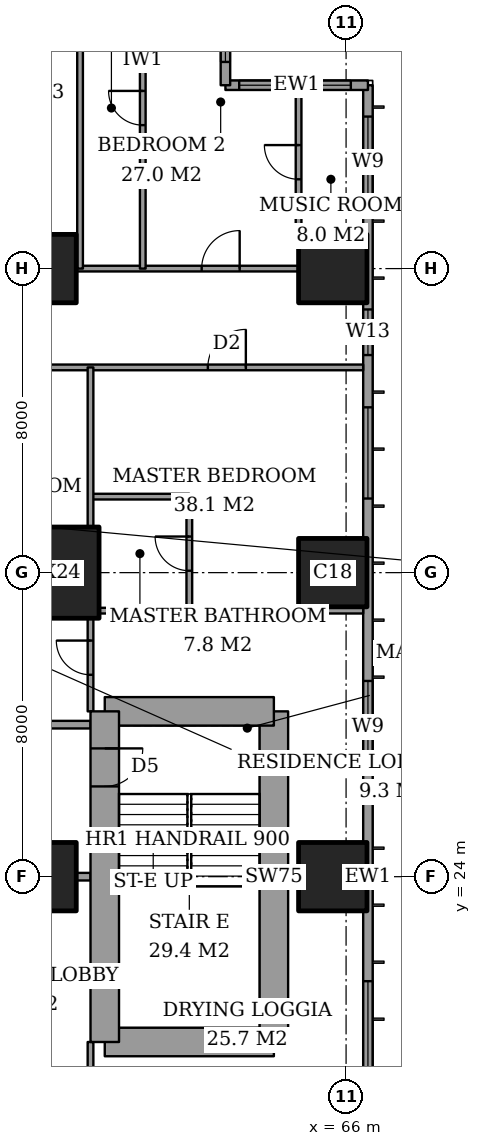
"""IFC4 building model, lengths in metres.
Left out: names, types, materials, properties, quantities, classifications, styles, units other than length and angle.
Written with IfcOpenShell. Run it as: python <this file> out.ifc"""

import sys

from ifc_helpers import new_model, si_unit, direction, frame, frame_2d, origin, origin_2d, place, context, subcontext, project, spatial, rectangle, extrude, element, fill, save


model = new_model("IFC4")
c1 = context("Model", 3, precision=1e-05, world=origin(), true_north=direction((0.0, 1.0)))
c2 = subcontext(c1, "Body", "Model", "MODEL_VIEW")
j1 = project(units=[si_unit("LENGTHUNIT", "METRE"), si_unit("PLANEANGLEUNIT", "RADIAN")], contexts=[c1])
p1 = place(None, origin())
s1 = spatial("IfcSite", under=j1, at=p1, CompositionType="ELEMENT")
p2 = place(p1, origin())
s2 = spatial("IfcBuilding", under=s1, at=p2, CompositionType="ELEMENT")
p3 = place(p2, frame((0.0, 0.0, 214.6)))
s3 = spatial("IfcBuildingStorey", under=s2, at=p3, CompositionType="ELEMENT", Elevation=214.6)
p4 = place(p3, frame((58.0, 24.0, 0.0), z_axis=(0.0, 0.0, 1.0), x_axis=(1.0, 0.0, 0.0)))
e1 = element("IfcColumn", 1, at=p4, inside=s3, PredefinedType="COLUMN", context=c2, shape_type="SweptSolid", body=[
    extrude(rectangle(XDim=1.8, YDim=1.8, at=origin_2d()), origin(), (0.0, 0.0, 1.0), 3.6),
])
p5 = place(p3, frame((58.0, 32.0, 0.0), z_axis=(0.0, 0.0, 1.0), x_axis=(1.0, 0.0, 0.0)))
e2 = element("IfcColumn", 2, at=p5, inside=s3, PredefinedType="COLUMN", context=c2, shape_type="SweptSolid", body=[
    extrude(rectangle(XDim=3.0, YDim=2.4, at=origin_2d()), origin(), (0.0, 0.0, 1.0), 3.6),
])
for number, where, z_axis, x_axis in (
    (3, (58.0, 40.0, 0.0), (0.0, 0.0, 1.0), (1.0, 0.0, 0.0)),
    (4, (65.65, 24.0, 0.0), (0.0, 0.0, 1.0), (1.0, 0.0, 0.0)),
    (5, (65.65, 32.0, 0.0), (0.0, 0.0, 1.0), (1.0, 0.0, 0.0)),
    (6, (65.65, 40.0, 0.0), (0.0, 0.0, 1.0), (1.0, 0.0, 0.0)),
):
    element("IfcColumn", number, at=place(p3, frame(where, z_axis=z_axis, x_axis=x_axis)), inside=s3, PredefinedType="COLUMN", context=c2, shape_type="SweptSolid", body=[
        extrude(rectangle(XDim=1.8, YDim=1.8, at=origin_2d()), origin(), (0.0, 0.0, 1.0), 3.6),
    ])
p6 = place(p3, frame((59.65, 19.65, 0.0), z_axis=(0.0, 0.0, 1.0), x_axis=(1.0, 0.0, 0.0)))
e7 = element("IfcWall", 7, at=p6, inside=s3, PredefinedType="SHEAR", context=c2, shape_type="SweptSolid", body=[
    extrude(rectangle(XDim=4.45, YDim=0.75, at=frame_2d((2.225, 0.0))), origin(), (0.0, 0.0, 1.0), 3.6),
])
p7 = place(p3, frame((64.1, 19.65, 0.0), z_axis=(0.0, 0.0, 1.0), x_axis=(0.0, 1.0, 0.0)))
e8 = element("IfcWall", 8, at=p7, inside=s3, PredefinedType="SHEAR", context=c2, shape_type="SweptSolid", body=[
    extrude(rectangle(XDim=8.7, YDim=0.75, at=frame_2d((4.35, 0.0))), origin(), (0.0, 0.0, 1.0), 3.6),
])
p8 = place(p3, frame((64.1, 28.35, 0.0), z_axis=(0.0, 0.0, 1.0), x_axis=(-1.0, 0.0, 0.0)))
e9 = element("IfcWall", 9, at=p8, inside=s3, PredefinedType="SHEAR", context=c2, shape_type="SweptSolid", body=[
    extrude(rectangle(XDim=4.45, YDim=0.75, at=frame_2d((2.225, 0.0))), origin(), (0.0, 0.0, 1.0), 3.6),
])
p9 = place(p3, frame((59.65, 28.35, 0.0), z_axis=(0.0, 0.0, 1.0), x_axis=(0.0, -1.0, 0.0)))
e10 = element("IfcWall", 10, at=p9, inside=s3, PredefinedType="SHEAR", context=c2, shape_type="SweptSolid", body=[
    extrude(rectangle(XDim=8.7, YDim=0.75, at=frame_2d((4.35, 0.0))), origin(), (0.0, 0.0, 1.0), 3.6),
])
p10 = place(p9, frame((0.975, 0.0, 0.0)))
e11 = element("IfcOpeningElement", 11, at=p10, cuts=e10, PredefinedType="OPENING", context=c2, shape_type="SweptSolid", body=[
    extrude(rectangle(XDim=1.0, YDim=2.1, at=frame_2d((0.5, 1.05))), frame((0.0, 0.385, 0.0), z_axis=(0.0, -1.0, 0.0), x_axis=(1.0, 0.0, 0.0)), (0.0, 0.0, 1.0), 0.77),
])
p11 = place(p3, frame((66.575, 3.175, 0.0), z_axis=(0.0, 0.0, 1.0), x_axis=(0.0, 1.0, 0.0)))
e12 = element("IfcWall", 12, at=p11, inside=s3, PredefinedType="SOLIDWALL", context=c2, shape_type="SweptSolid", body=[
    extrude(rectangle(XDim=41.65, YDim=0.25, at=frame_2d((20.825, 0.0))), origin(), (0.0, 0.0, 1.0), 3.6),
])
p12 = place(p11, frame((0.825, 0.0, 0.2)))
e13 = element("IfcOpeningElement", 13, at=p12, cuts=e12, PredefinedType="OPENING", context=c2, shape_type="SweptSolid", body=[
    extrude(rectangle(XDim=2.4, YDim=2.4, at=frame_2d((1.2, 1.2))), frame((0.0, 0.135, 0.0), z_axis=(0.0, -1.0, 0.0), x_axis=(1.0, 0.0, 0.0)), (0.0, 0.0, 1.0), 0.27),
])
p13 = place(p11, frame((6.225, 0.0, 0.2)))
e14 = element("IfcOpeningElement", 14, at=p13, cuts=e12, PredefinedType="OPENING", context=c2, shape_type="SweptSolid", body=[
    extrude(rectangle(XDim=1.2, YDim=2.4, at=frame_2d((0.6, 1.2))), frame((0.0, 0.135, 0.0), z_axis=(0.0, -1.0, 0.0), x_axis=(1.0, 0.0, 0.0)), (0.0, 0.0, 1.0), 0.27),
])
p14 = place(p11, frame((8.675, 0.0, 0.2)))
e15 = element("IfcOpeningElement", 15, at=p14, cuts=e12, PredefinedType="OPENING", context=c2, shape_type="SweptSolid", body=[
    extrude(rectangle(XDim=2.4, YDim=2.4, at=frame_2d((1.2, 1.2))), frame((0.0, 0.135, 0.0), z_axis=(0.0, -1.0, 0.0), x_axis=(1.0, 0.0, 0.0)), (0.0, 0.0, 1.0), 0.27),
])
p15 = place(p11, frame((15.675, 0.0, 0.2)))
e16 = element("IfcOpeningElement", 16, at=p15, cuts=e12, PredefinedType="OPENING", context=c2, shape_type="SweptSolid", body=[
    extrude(rectangle(XDim=2.4, YDim=2.4, at=frame_2d((1.2, 1.2))), frame((0.0, 0.135, 0.0), z_axis=(0.0, -1.0, 0.0), x_axis=(1.0, 0.0, 0.0)), (0.0, 0.0, 1.0), 0.27),
])
p16 = place(p11, frame((23.575, 0.0, 0.2)))
e17 = element("IfcOpeningElement", 17, at=p16, cuts=e12, PredefinedType="OPENING", context=c2, shape_type="SweptSolid", body=[
    extrude(rectangle(XDim=2.4, YDim=2.4, at=frame_2d((1.2, 1.2))), frame((0.0, 0.135, 0.0), z_axis=(0.0, -1.0, 0.0), x_axis=(1.0, 0.0, 0.0)), (0.0, 0.0, 1.0), 0.27),
])
p17 = place(p11, frame((30.775, 0.0, 0.2)))
e18 = element("IfcOpeningElement", 18, at=p17, cuts=e12, PredefinedType="OPENING", context=c2, shape_type="SweptSolid", body=[
    extrude(rectangle(XDim=2.4, YDim=2.4, at=frame_2d((1.2, 1.2))), frame((0.0, 0.135, 0.0), z_axis=(0.0, -1.0, 0.0), x_axis=(1.0, 0.0, 0.0)), (0.0, 0.0, 1.0), 0.27),
])
p18 = place(p11, frame((34.55, 0.0, 0.2)))
e19 = element("IfcOpeningElement", 19, at=p18, cuts=e12, PredefinedType="OPENING", context=c2, shape_type="SweptSolid", body=[
    extrude(rectangle(XDim=1.2, YDim=2.4, at=frame_2d((0.6, 1.2))), frame((0.0, 0.135, 0.0), z_axis=(0.0, -1.0, 0.0), x_axis=(1.0, 0.0, 0.0)), (0.0, 0.0, 1.0), 0.27),
])
p19 = place(p11, frame((38.425, 0.0, 0.2)))
e20 = element("IfcOpeningElement", 20, at=p19, cuts=e12, PredefinedType="OPENING", context=c2, shape_type="SweptSolid", body=[
    extrude(rectangle(XDim=2.4, YDim=2.4, at=frame_2d((1.2, 1.2))), frame((0.0, 0.135, 0.0), z_axis=(0.0, -1.0, 0.0), x_axis=(1.0, 0.0, 0.0)), (0.0, 0.0, 1.0), 0.27),
])
p20 = place(p3, frame((66.575, 44.825, 0.0), z_axis=(0.0, 0.0, 1.0), x_axis=(-1.0, 0.0, 0.0)))
e21 = element("IfcWall", 21, at=p20, inside=s3, PredefinedType="SOLIDWALL", context=c2, shape_type="SweptSolid", body=[
    extrude(rectangle(XDim=3.75, YDim=0.25, at=frame_2d((1.875, 0.0))), origin(), (0.0, 0.0, 1.0), 3.6),
])
p21 = place(p20, frame((0.45, 0.0, 0.2)))
e22 = element("IfcOpeningElement", 22, at=p21, cuts=e21, PredefinedType="OPENING", context=c2, shape_type="SweptSolid", body=[
    extrude(rectangle(XDim=1.2, YDim=2.4, at=frame_2d((0.6, 1.2))), frame((0.0, 0.135, 0.0), z_axis=(0.0, -1.0, 0.0), x_axis=(1.0, 0.0, 0.0)), (0.0, 0.0, 1.0), 0.27),
])
p22 = place(p20, frame((2.188, 0.0, 0.2)))
e23 = element("IfcOpeningElement", 23, at=p22, cuts=e21, PredefinedType="OPENING", context=c2, shape_type="SweptSolid", body=[
    extrude(rectangle(XDim=1.2, YDim=2.4, at=frame_2d((0.6, 1.2))), frame((0.0, 0.135, 0.0), z_axis=(0.0, -1.0, 0.0), x_axis=(1.0, 0.0, 0.0)), (0.0, 0.0, 1.0), 0.27),
])
p23 = place(p3, frame((62.825, 44.825, 0.0), z_axis=(0.0, 0.0, 1.0), x_axis=(0.0, 1.0, 0.0)))
e24 = element("IfcWall", 24, at=p23, inside=s3, PredefinedType="SOLIDWALL", context=c2, shape_type="SweptSolid", body=[
    extrude(rectangle(XDim=3.75, YDim=0.25, at=frame_2d((1.875, 0.0))), origin(), (0.0, 0.0, 1.0), 3.6),
])
p24 = place(p23, frame((0.613, 0.0, 0.2)))
e25 = element("IfcOpeningElement", 25, at=p24, cuts=e24, PredefinedType="OPENING", context=c2, shape_type="SweptSolid", body=[
    extrude(rectangle(XDim=2.4, YDim=2.4, at=frame_2d((1.2, 1.2))), frame((0.0, 0.135, 0.0), z_axis=(0.0, -1.0, 0.0), x_axis=(1.0, 0.0, 0.0)), (0.0, 0.0, 1.0), 0.27),
])
p25 = place(p3, frame((58.9, 24.0, 0.0), z_axis=(0.0, 0.0, 1.0), x_axis=(1.0, 0.0, 0.0)))
e26 = element("IfcWall", 26, at=p25, inside=s3, PredefinedType="PARTITIONING", context=c2, shape_type="SweptSolid", body=[
    extrude(rectangle(XDim=0.375, YDim=0.2, at=frame_2d((0.188, 0.0))), origin(), (0.0, 0.0, 1.0), 3.35),
])
p26 = place(p3, frame((42.0, 28.0, 0.0), z_axis=(0.0, 0.0, 1.0), x_axis=(1.0, 0.0, 0.0)))
e27 = element("IfcWall", 27, at=p26, inside=s3, PredefinedType="PARTITIONING", context=c2, shape_type="SweptSolid", body=[
    extrude(rectangle(XDim=17.275, YDim=0.2, at=frame_2d((8.637, 0.0))), origin(), (0.0, 0.0, 1.0), 3.35),
])
p27 = place(p26, frame((9.4, 0.0, 0.0)))
e28 = element("IfcOpeningElement", 28, at=p27, cuts=e27, PredefinedType="OPENING", context=c2, shape_type="SweptSolid", body=[
    extrude(rectangle(XDim=1.2, YDim=2.4, at=frame_2d((0.6, 1.2))), frame((0.0, 0.11, 0.0), z_axis=(0.0, -1.0, 0.0), x_axis=(1.0, 0.0, 0.0)), (0.0, 0.0, 1.0), 0.22),
])
p28 = place(p3, frame((59.5, 31.0, 0.0), z_axis=(0.0, 0.0, 1.0), x_axis=(1.0, 0.0, 0.0)))
e29 = element("IfcWall", 29, at=p28, inside=s3, PredefinedType="PARTITIONING", context=c2, shape_type="SweptSolid", body=[
    extrude(rectangle(XDim=6.95, YDim=0.15, at=frame_2d((3.475, 0.0))), origin(), (0.0, 0.0, 1.0), 3.35),
])
p29 = place(p3, frame((59.275, 34.0, 0.0), z_axis=(0.0, 0.0, 1.0), x_axis=(1.0, 0.0, 0.0)))
e30 = element("IfcWall", 30, at=p29, inside=s3, PredefinedType="PARTITIONING", context=c2, shape_type="SweptSolid", body=[
    extrude(rectangle(XDim=2.6, YDim=0.15, at=frame_2d((1.3, 0.0))), origin(), (0.0, 0.0, 1.0), 3.35),
])
p30 = place(p3, frame((41.439, 37.4, 0.0), z_axis=(0.0, 0.0, 1.0), x_axis=(1.0, 0.0, 0.0)))
e31 = element("IfcWall", 31, at=p30, inside=s3, PredefinedType="PARTITIONING", context=c2, shape_type="SweptSolid", body=[
    extrude(rectangle(XDim=25.011, YDim=0.15, at=frame_2d((12.505, 0.0))), origin(), (0.0, 0.0, 1.0), 3.35),
])
p31 = place(p30, frame((10.761, 0.0, 0.0)))
e32 = element("IfcOpeningElement", 32, at=p31, cuts=e31, PredefinedType="OPENING", context=c2, shape_type="SweptSolid", body=[
    extrude(rectangle(XDim=1.0, YDim=2.1, at=frame_2d((0.5, 1.05))), frame((0.0, 0.085, 0.0), z_axis=(0.0, -1.0, 0.0), x_axis=(1.0, 0.0, 0.0)), (0.0, 0.0, 1.0), 0.17),
])
p32 = place(p30, frame((20.924, 0.0, 0.0)))
e33 = element("IfcOpeningElement", 33, at=p32, cuts=e31, PredefinedType="OPENING", context=c2, shape_type="SweptSolid", body=[
    extrude(rectangle(XDim=1.0, YDim=2.1, at=frame_2d((0.5, 1.05))), frame((0.0, 0.085, 0.0), z_axis=(0.0, -1.0, 0.0), x_axis=(1.0, 0.0, 0.0)), (0.0, 0.0, 1.0), 0.17),
])
p33 = place(p30, frame((15.749, 0.0, 0.0)))
e34 = element("IfcOpeningElement", 34, at=p33, cuts=e31, PredefinedType="OPENING", context=c2, shape_type="SweptSolid", body=[
    extrude(rectangle(XDim=0.9, YDim=2.1, at=frame_2d((0.45, 1.05))), frame((0.0, 0.085, 0.0), z_axis=(0.0, -1.0, 0.0), x_axis=(1.0, 0.0, 0.0)), (0.0, 0.0, 1.0), 0.17),
])
p34 = place(p30, frame((12.961, 0.0, 0.0)))
e35 = element("IfcOpeningElement", 35, at=p34, cuts=e31, PredefinedType="OPENING", context=c2, shape_type="SweptSolid", body=[
    extrude(rectangle(XDim=1.0, YDim=2.1, at=frame_2d((0.5, 1.05))), frame((0.0, 0.085, 0.0), z_axis=(0.0, -1.0, 0.0), x_axis=(1.0, 0.0, 0.0)), (0.0, 0.0, 1.0), 0.17),
])
p35 = place(p30, frame((7.911, 0.0, 0.0)))
e36 = element("IfcOpeningElement", 36, at=p35, cuts=e31, PredefinedType="OPENING", context=c2, shape_type="SweptSolid", body=[
    extrude(rectangle(XDim=0.9, YDim=2.1, at=frame_2d((0.45, 1.05))), frame((0.0, 0.085, 0.0), z_axis=(0.0, -1.0, 0.0), x_axis=(1.0, 0.0, 0.0)), (0.0, 0.0, 1.0), 0.17),
])
p36 = place(p30, frame((2.836, 0.0, 0.0)))
e37 = element("IfcOpeningElement", 37, at=p36, cuts=e31, PredefinedType="OPENING", context=c2, shape_type="SweptSolid", body=[
    extrude(rectangle(XDim=1.0, YDim=2.1, at=frame_2d((0.5, 1.05))), frame((0.0, 0.085, 0.0), z_axis=(0.0, -1.0, 0.0), x_axis=(1.0, 0.0, 0.0)), (0.0, 0.0, 1.0), 0.17),
])
p37 = place(p3, frame((58.9, 40.0, 0.0), z_axis=(0.0, 0.0, 1.0), x_axis=(1.0, 0.0, 0.0)))
e38 = element("IfcWall", 38, at=p37, inside=s3, PredefinedType="PARTITIONING", context=c2, shape_type="SweptSolid", body=[
    extrude(rectangle(XDim=5.85, YDim=0.15, at=frame_2d((2.925, 0.0))), origin(), (0.0, 0.0, 1.0), 3.35),
])
p38 = place(p37, frame((3.3, 0.0, 0.0)))
e39 = element("IfcOpeningElement", 39, at=p38, cuts=e38, PredefinedType="OPENING", context=c2, shape_type="SweptSolid", body=[
    extrude(rectangle(XDim=1.0, YDim=2.1, at=frame_2d((0.5, 1.05))), frame((0.0, 0.085, 0.0), z_axis=(0.0, -1.0, 0.0), x_axis=(1.0, 0.0, 0.0)), (0.0, 0.0, 1.0), 0.17),
])
p39 = place(p3, frame((59.0, 40.0, 0.0), z_axis=(0.0, 0.0, 1.0), x_axis=(0.0, 1.0, 0.0)))
e40 = element("IfcWall", 40, at=p39, inside=s3, PredefinedType="PARTITIONING", context=c2, shape_type="SweptSolid", body=[
    extrude(rectangle(XDim=8.45, YDim=0.15, at=frame_2d((4.225, 0.0))), origin(), (0.0, 0.0, 1.0), 3.35),
])
p40 = place(p3, frame((59.275, 17.2, 0.0), z_axis=(0.0, 0.0, 1.0), x_axis=(0.0, 1.0, 0.0)))
e41 = element("IfcWall", 41, at=p40, inside=s3, PredefinedType="PARTITIONING", context=c2, shape_type="SweptSolid", body=[
    extrude(rectangle(XDim=2.45, YDim=0.15, at=frame_2d((1.225, 0.0))), origin(), (0.0, 0.0, 1.0), 3.35),
])
p41 = place(p40, frame((0.587, 0.0, 0.0)))
e42 = element("IfcOpeningElement", 42, at=p41, cuts=e41, PredefinedType="OPENING", context=c2, shape_type="SweptSolid", body=[
    extrude(rectangle(XDim=0.9, YDim=2.1, at=frame_2d((0.45, 1.05))), frame((0.0, 0.085, 0.0), z_axis=(0.0, -1.0, 0.0), x_axis=(1.0, 0.0, 0.0)), (0.0, 0.0, 1.0), 0.17),
])
p42 = place(p3, frame((59.275, 28.35, 0.0), z_axis=(0.0, 0.0, 1.0), x_axis=(0.0, 1.0, 0.0)))
e43 = element("IfcWall", 43, at=p42, inside=s3, PredefinedType="PARTITIONING", context=c2, shape_type="SweptSolid", body=[
    extrude(rectangle(XDim=2.45, YDim=0.15, at=frame_2d((1.225, 0.0))), origin(), (0.0, 0.0, 1.0), 3.35),
])
p43 = place(p42, frame((0.962, 0.0, 0.0)))
e44 = element("IfcOpeningElement", 44, at=p43, cuts=e43, PredefinedType="OPENING", context=c2, shape_type="SweptSolid", body=[
    extrude(rectangle(XDim=0.9, YDim=2.1, at=frame_2d((0.45, 1.05))), frame((0.0, 0.085, 0.0), z_axis=(0.0, -1.0, 0.0), x_axis=(1.0, 0.0, 0.0)), (0.0, 0.0, 1.0), 0.17),
])
p44 = place(p3, frame((59.275, 33.2, 0.0), z_axis=(0.0, 0.0, 1.0), x_axis=(0.0, 1.0, 0.0)))
e45 = element("IfcWall", 45, at=p44, inside=s3, PredefinedType="PARTITIONING", context=c2, shape_type="SweptSolid", body=[
    extrude(rectangle(XDim=4.2, YDim=0.15, at=frame_2d((2.1, 0.0))), origin(), (0.0, 0.0, 1.0), 3.35),
])
p45 = place(p3, frame((60.65, 40.0, 0.0), z_axis=(0.0, 0.0, 1.0), x_axis=(0.0, 1.0, 0.0)))
e46 = element("IfcWall", 46, at=p45, inside=s3, PredefinedType="PARTITIONING", context=c2, shape_type="SweptSolid", body=[
    extrude(rectangle(XDim=8.45, YDim=0.15, at=frame_2d((4.225, 0.0))), origin(), (0.0, 0.0, 1.0), 3.35),
])
p46 = place(p45, frame((3.775, 0.0, 0.0)))
e47 = element("IfcOpeningElement", 47, at=p46, cuts=e46, PredefinedType="OPENING", context=c2, shape_type="SweptSolid", body=[
    extrude(rectangle(XDim=0.9, YDim=2.1, at=frame_2d((0.45, 1.05))), frame((0.0, 0.085, 0.0), z_axis=(0.0, -1.0, 0.0), x_axis=(1.0, 0.0, 0.0)), (0.0, 0.0, 1.0), 0.17),
])
p47 = place(p3, frame((61.875, 31.0, 0.0), z_axis=(0.0, 0.0, 1.0), x_axis=(0.0, 1.0, 0.0)))
e48 = element("IfcWall", 48, at=p47, inside=s3, PredefinedType="PARTITIONING", context=c2, shape_type="SweptSolid", body=[
    extrude(rectangle(XDim=3.0, YDim=0.15, at=frame_2d((1.5, 0.0))), origin(), (0.0, 0.0, 1.0), 3.35),
])
p48 = place(p47, frame((1.05, 0.0, 0.0)))
e49 = element("IfcOpeningElement", 49, at=p48, cuts=e48, PredefinedType="OPENING", context=c2, shape_type="SweptSolid", body=[
    extrude(rectangle(XDim=0.9, YDim=2.1, at=frame_2d((0.45, 1.05))), frame((0.0, 0.085, 0.0), z_axis=(0.0, -1.0, 0.0), x_axis=(1.0, 0.0, 0.0)), (0.0, 0.0, 1.0), 0.17),
])
p49 = place(p3, frame((64.75, 40.9, 0.0), z_axis=(0.0, 0.0, 1.0), x_axis=(0.0, 1.0, 0.0)))
e50 = element("IfcWall", 50, at=p49, inside=s3, PredefinedType="PARTITIONING", context=c2, shape_type="SweptSolid", body=[
    extrude(rectangle(XDim=3.8, YDim=0.15, at=frame_2d((1.9, 0.0))), origin(), (0.0, 0.0, 1.0), 3.35),
])
p50 = place(p49, frame((1.45, 0.0, 0.0)))
e51 = element("IfcOpeningElement", 51, at=p50, cuts=e50, PredefinedType="OPENING", context=c2, shape_type="SweptSolid", body=[
    extrude(rectangle(XDim=0.9, YDim=2.1, at=frame_2d((0.45, 1.05))), frame((0.0, 0.085, 0.0), z_axis=(0.0, -1.0, 0.0), x_axis=(1.0, 0.0, 0.0)), (0.0, 0.0, 1.0), 0.17),
])
p51 = place(p15, origin())
e52 = element("IfcWindow", 52, at=p51, inside=s3, PartitioningType="SINGLE_PANEL", PredefinedType="WINDOW", context=c2, shape_type="SweptSolid", body=[
    extrude(rectangle(XDim=2.4, YDim=2.4, at=frame_2d((1.2, 1.2))), frame((0.0, 0.03, 0.0), z_axis=(0.0, -1.0, 0.0), x_axis=(1.0, 0.0, 0.0)), (0.0, 0.0, 1.0), 0.06),
])
fill(e16, e52)
p52 = place(p16, origin())
e53 = element("IfcWindow", 53, at=p52, inside=s3, PartitioningType="SINGLE_PANEL", PredefinedType="WINDOW", context=c2, shape_type="SweptSolid", body=[
    extrude(rectangle(XDim=2.4, YDim=2.4, at=frame_2d((1.2, 1.2))), frame((0.0, 0.03, 0.0), z_axis=(0.0, -1.0, 0.0), x_axis=(1.0, 0.0, 0.0)), (0.0, 0.0, 1.0), 0.06),
])
fill(e17, e53)
p53 = place(p17, origin())
e54 = element("IfcWindow", 54, at=p53, inside=s3, PartitioningType="SINGLE_PANEL", PredefinedType="WINDOW", context=c2, shape_type="SweptSolid", body=[
    extrude(rectangle(XDim=2.4, YDim=2.4, at=frame_2d((1.2, 1.2))), frame((0.0, 0.03, 0.0), z_axis=(0.0, -1.0, 0.0), x_axis=(1.0, 0.0, 0.0)), (0.0, 0.0, 1.0), 0.06),
])
fill(e18, e54)
p54 = place(p18, origin())
e55 = element("IfcWindow", 55, at=p54, inside=s3, PartitioningType="SINGLE_PANEL", PredefinedType="WINDOW", context=c2, shape_type="SweptSolid", body=[
    extrude(rectangle(XDim=1.2, YDim=2.4, at=frame_2d((0.6, 1.2))), frame((0.0, 0.03, 0.0), z_axis=(0.0, -1.0, 0.0), x_axis=(1.0, 0.0, 0.0)), (0.0, 0.0, 1.0), 0.06),
])
fill(e19, e55)
p55 = place(p19, origin())
e56 = element("IfcWindow", 56, at=p55, inside=s3, PartitioningType="SINGLE_PANEL", PredefinedType="WINDOW", context=c2, shape_type="SweptSolid", body=[
    extrude(rectangle(XDim=2.4, YDim=2.4, at=frame_2d((1.2, 1.2))), frame((0.0, 0.03, 0.0), z_axis=(0.0, -1.0, 0.0), x_axis=(1.0, 0.0, 0.0)), (0.0, 0.0, 1.0), 0.06),
])
fill(e20, e56)
p56 = place(p21, origin())
e57 = element("IfcWindow", 57, at=p56, inside=s3, PartitioningType="SINGLE_PANEL", PredefinedType="WINDOW", context=c2, shape_type="SweptSolid", body=[
    extrude(rectangle(XDim=1.2, YDim=2.4, at=frame_2d((0.6, 1.2))), frame((0.0, 0.03, 0.0), z_axis=(0.0, -1.0, 0.0), x_axis=(1.0, 0.0, 0.0)), (0.0, 0.0, 1.0), 0.06),
])
fill(e22, e57)
p57 = place(p22, origin())
e58 = element("IfcWindow", 58, at=p57, inside=s3, PartitioningType="SINGLE_PANEL", PredefinedType="WINDOW", context=c2, shape_type="SweptSolid", body=[
    extrude(rectangle(XDim=1.2, YDim=2.4, at=frame_2d((0.6, 1.2))), frame((0.0, 0.03, 0.0), z_axis=(0.0, -1.0, 0.0), x_axis=(1.0, 0.0, 0.0)), (0.0, 0.0, 1.0), 0.06),
])
fill(e23, e58)
p58 = place(p24, origin())
e59 = element("IfcWindow", 59, at=p58, inside=s3, PartitioningType="SINGLE_PANEL", PredefinedType="WINDOW", context=c2, shape_type="SweptSolid", body=[
    extrude(rectangle(XDim=2.4, YDim=2.4, at=frame_2d((1.2, 1.2))), frame((0.0, 0.03, 0.0), z_axis=(0.0, -1.0, 0.0), x_axis=(1.0, 0.0, 0.0)), (0.0, 0.0, 1.0), 0.06),
])
fill(e25, e59)
p59 = place(p50, origin())
e60 = element("IfcDoor", 60, at=p59, inside=s3, OperationType="SINGLE_SWING_LEFT", PredefinedType="DOOR", context=c2, shape_type="SweptSolid", body=[
    extrude(rectangle(XDim=0.9, YDim=2.1, at=frame_2d((0.45, 1.05))), frame((0.0, 0.025, 0.0), z_axis=(0.0, -1.0, 0.0), x_axis=(1.0, 0.0, 0.0)), (0.0, 0.0, 1.0), 0.05),
])
fill(e51, e60)
p60 = place(p38, origin())
e61 = element("IfcDoor", 61, at=p60, inside=s3, OperationType="SINGLE_SWING_LEFT", PredefinedType="DOOR", context=c2, shape_type="SweptSolid", body=[
    extrude(rectangle(XDim=1.0, YDim=2.1, at=frame_2d((0.5, 1.05))), frame((0.0, 0.025, 0.0), z_axis=(0.0, -1.0, 0.0), x_axis=(1.0, 0.0, 0.0)), (0.0, 0.0, 1.0), 0.05),
])
fill(e39, e61)
p61 = place(p46, origin())
e62 = element("IfcDoor", 62, at=p61, inside=s3, OperationType="SINGLE_SWING_LEFT", PredefinedType="DOOR", context=c2, shape_type="SweptSolid", body=[
    extrude(rectangle(XDim=0.9, YDim=2.1, at=frame_2d((0.45, 1.05))), frame((0.0, 0.025, 0.0), z_axis=(0.0, -1.0, 0.0), x_axis=(1.0, 0.0, 0.0)), (0.0, 0.0, 1.0), 0.05),
])
fill(e47, e62)
p62 = place(p48, origin())
e63 = element("IfcDoor", 63, at=p62, inside=s3, OperationType="SINGLE_SWING_LEFT", PredefinedType="DOOR", context=c2, shape_type="SweptSolid", body=[
    extrude(rectangle(XDim=0.9, YDim=2.1, at=frame_2d((0.45, 1.05))), frame((0.0, 0.025, 0.0), z_axis=(0.0, -1.0, 0.0), x_axis=(1.0, 0.0, 0.0)), (0.0, 0.0, 1.0), 0.05),
])
fill(e49, e63)
p63 = place(p32, origin())
e64 = element("IfcDoor", 64, at=p63, inside=s3, OperationType="SINGLE_SWING_LEFT", PredefinedType="DOOR", context=c2, shape_type="SweptSolid", body=[
    extrude(rectangle(XDim=1.0, YDim=2.1, at=frame_2d((0.5, 1.05))), frame((0.0, 0.025, 0.0), z_axis=(0.0, -1.0, 0.0), x_axis=(1.0, 0.0, 0.0)), (0.0, 0.0, 1.0), 0.05),
])
fill(e33, e64)
p64 = place(p43, origin())
e65 = element("IfcDoor", 65, at=p64, inside=s3, OperationType="SINGLE_SWING_LEFT", PredefinedType="DOOR", context=c2, shape_type="SweptSolid", body=[
    extrude(rectangle(XDim=0.9, YDim=2.1, at=frame_2d((0.45, 1.05))), frame((0.0, 0.025, 0.0), z_axis=(0.0, -1.0, 0.0), x_axis=(1.0, 0.0, 0.0)), (0.0, 0.0, 1.0), 0.05),
])
fill(e44, e65)
p65 = place(p10, origin())
e66 = element("IfcDoor", 66, at=p65, inside=s3, OperationType="SINGLE_SWING_RIGHT", PredefinedType="DOOR", context=c2, shape_type="SweptSolid", body=[
    extrude(rectangle(XDim=1.0, YDim=2.1, at=frame_2d((0.5, 1.05))), frame((0.0, 0.025, 0.0), z_axis=(0.0, -1.0, 0.0), x_axis=(1.0, 0.0, 0.0)), (0.0, 0.0, 1.0), 0.05),
])
fill(e11, e66)
save(model, sys.argv[1])
